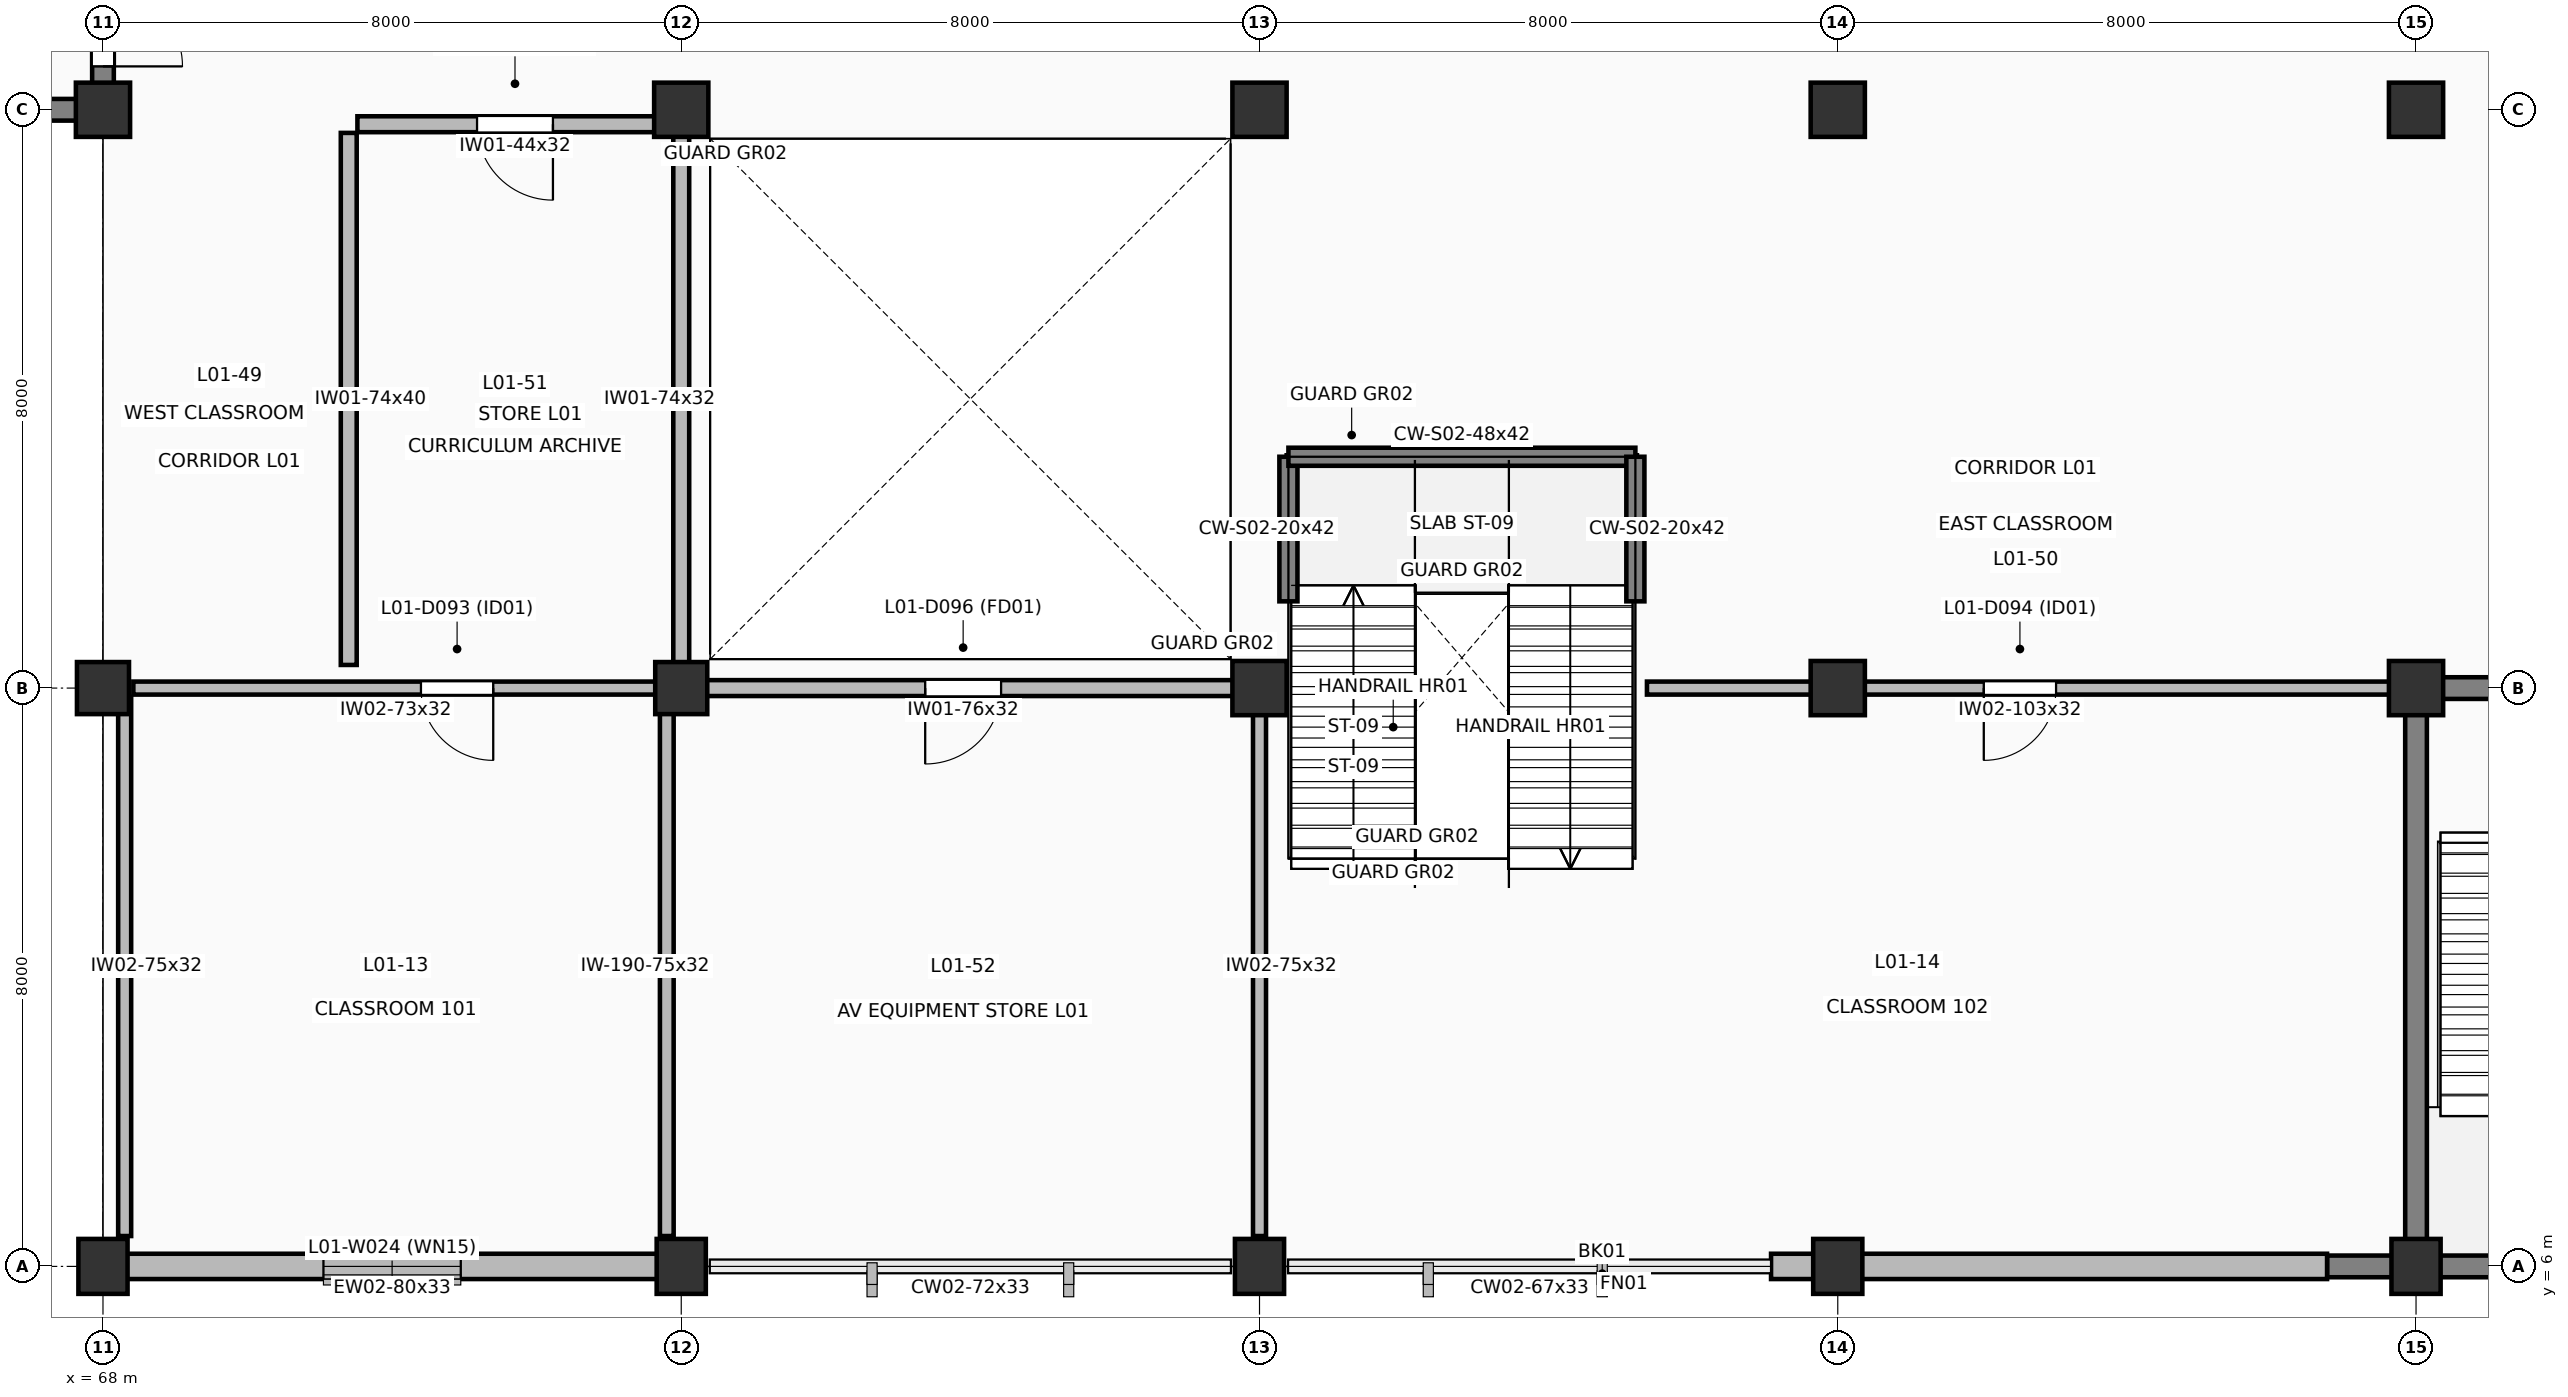
"""IFC4 building model, lengths in metres.
Left out: names, types, materials, properties, quantities, classifications, styles, units other than length and angle.
Written with IfcOpenShell. Run it as: python <this file> out.ifc"""

import sys

from ifc_helpers import new_model, si_unit, direction, frame, frame_2d, origin, origin_2d, place, context, subcontext, project, spatial, rectangle, extrude, element, fill, save


model = new_model("IFC4")
c1 = context("Model", 3, precision=1e-05, world=origin(), true_north=direction((0.0, 1.0)))
c2 = subcontext(c1, "Body", "Model", "MODEL_VIEW")
j1 = project(units=[si_unit("LENGTHUNIT", "METRE"), si_unit("PLANEANGLEUNIT", "RADIAN")], contexts=[c1])
p1 = place(None, origin())
s1 = spatial("IfcSite", under=j1, at=p1, CompositionType="ELEMENT")
p2 = place(p1, origin())
s2 = spatial("IfcBuilding", under=s1, at=p2, CompositionType="ELEMENT")
p3 = place(p2, frame((0.0, 0.0, 5.4)))
s3 = spatial("IfcBuildingStorey", under=s2, at=p3, CompositionType="ELEMENT", Elevation=5.4)
p4 = place(p3, frame((68.0, 6.0, 0.0), z_axis=(0.0, 0.0, 1.0), x_axis=(1.0, 0.0, 0.0)))
e1 = element("IfcColumn", 1, at=p4, inside=s3, PredefinedType="PILASTER", context=c2, shape_type="SweptSolid", body=[
    extrude(rectangle(XDim=0.68, YDim=0.76, at=origin_2d()), origin(), (0.0, 0.0, 1.0), 4.2),
])
p5 = place(p3, frame((68.0, 14.0, 0.0), z_axis=(0.0, 0.0, 1.0), x_axis=(1.0, 0.0, 0.0)))
e2 = element("IfcColumn", 2, at=p5, inside=s3, PredefinedType="COLUMN", context=c2, shape_type="SweptSolid", body=[
    extrude(rectangle(XDim=0.72, YDim=0.72, at=origin_2d()), origin(), (0.0, 0.0, 1.0), 4.2),
])
p6 = place(p3, frame((68.0, 22.0, 0.0), z_axis=(0.0, 0.0, 1.0), x_axis=(1.0, 0.0, 0.0)))
e3 = element("IfcColumn", 3, at=p6, inside=s3, PredefinedType="COLUMN", context=c2, shape_type="SweptSolid", body=[
    extrude(rectangle(XDim=0.75, YDim=0.75, at=origin_2d()), origin(), (0.0, 0.0, 1.0), 4.2),
])
p7 = place(p3, frame((76.0, 6.0, 0.0), z_axis=(0.0, 0.0, 1.0), x_axis=(1.0, 0.0, 0.0)))
e4 = element("IfcColumn", 4, at=p7, inside=s3, PredefinedType="PILASTER", context=c2, shape_type="SweptSolid", body=[
    extrude(rectangle(XDim=0.68, YDim=0.76, at=origin_2d()), origin(), (0.0, 0.0, 1.0), 4.2),
])
p8 = place(p3, frame((76.0, 14.0, 0.0), z_axis=(0.0, 0.0, 1.0), x_axis=(1.0, 0.0, 0.0)))
e5 = element("IfcColumn", 5, at=p8, inside=s3, PredefinedType="COLUMN", context=c2, shape_type="SweptSolid", body=[
    extrude(rectangle(XDim=0.72, YDim=0.72, at=origin_2d()), origin(), (0.0, 0.0, 1.0), 4.2),
])
p9 = place(p3, frame((76.0, 22.0, 0.0), z_axis=(0.0, 0.0, 1.0), x_axis=(1.0, 0.0, 0.0)))
e6 = element("IfcColumn", 6, at=p9, inside=s3, PredefinedType="COLUMN", context=c2, shape_type="SweptSolid", body=[
    extrude(rectangle(XDim=0.75, YDim=0.75, at=origin_2d()), origin(), (0.0, 0.0, 1.0), 4.2),
])
p10 = place(p3, frame((84.0, 6.0, 0.0), z_axis=(0.0, 0.0, 1.0), x_axis=(1.0, 0.0, 0.0)))
e7 = element("IfcColumn", 7, at=p10, inside=s3, PredefinedType="PILASTER", context=c2, shape_type="SweptSolid", body=[
    extrude(rectangle(XDim=0.68, YDim=0.76, at=origin_2d()), origin(), (0.0, 0.0, 1.0), 4.2),
])
for number, where, z_axis, x_axis in (
    (8, (84.0, 14.0, 0.0), (0.0, 0.0, 1.0), (1.0, 0.0, 0.0)),
    (9, (84.0, 22.0, 0.0), (0.0, 0.0, 1.0), (1.0, 0.0, 0.0)),
):
    element("IfcColumn", number, at=place(p3, frame(where, z_axis=z_axis, x_axis=x_axis)), inside=s3, PredefinedType="COLUMN", context=c2, shape_type="SweptSolid", body=[
        extrude(rectangle(XDim=0.75, YDim=0.75, at=origin_2d()), origin(), (0.0, 0.0, 1.0), 4.2),
    ])
p11 = place(p3, frame((92.0, 6.0, 0.0), z_axis=(0.0, 0.0, 1.0), x_axis=(1.0, 0.0, 0.0)))
e10 = element("IfcColumn", 10, at=p11, inside=s3, PredefinedType="PILASTER", context=c2, shape_type="SweptSolid", body=[
    extrude(rectangle(XDim=0.68, YDim=0.76, at=origin_2d()), origin(), (0.0, 0.0, 1.0), 4.2),
])
for number, where, z_axis, x_axis in (
    (11, (92.0, 14.0, 0.0), (0.0, 0.0, 1.0), (1.0, 0.0, 0.0)),
    (12, (92.0, 22.0, 0.0), (0.0, 0.0, 1.0), (1.0, 0.0, 0.0)),
):
    element("IfcColumn", number, at=place(p3, frame(where, z_axis=z_axis, x_axis=x_axis)), inside=s3, PredefinedType="COLUMN", context=c2, shape_type="SweptSolid", body=[
        extrude(rectangle(XDim=0.75, YDim=0.75, at=origin_2d()), origin(), (0.0, 0.0, 1.0), 4.2),
    ])
p12 = place(p3, frame((100.0, 6.0, 0.0), z_axis=(0.0, 0.0, 1.0), x_axis=(1.0, 0.0, 0.0)))
e13 = element("IfcColumn", 13, at=p12, inside=s3, PredefinedType="PILASTER", context=c2, shape_type="SweptSolid", body=[
    extrude(rectangle(XDim=0.68, YDim=0.76, at=origin_2d()), origin(), (0.0, 0.0, 1.0), 4.2),
])
for number, where, z_axis, x_axis in (
    (14, (100.0, 14.0, 0.0), (0.0, 0.0, 1.0), (1.0, 0.0, 0.0)),
    (15, (100.0, 22.0, 0.0), (0.0, 0.0, 1.0), (1.0, 0.0, 0.0)),
):
    element("IfcColumn", number, at=place(p3, frame(where, z_axis=z_axis, x_axis=x_axis)), inside=s3, PredefinedType="COLUMN", context=c2, shape_type="SweptSolid", body=[
        extrude(rectangle(XDim=0.75, YDim=0.75, at=origin_2d()), origin(), (0.0, 0.0, 1.0), 4.2),
    ])
p13 = place(p3, frame((106.461, 6.0, 0.0), z_axis=(0.0, 0.0, 1.0), x_axis=(-1.0, 0.0, 0.0)))
e16 = element("IfcWall", 16, at=p13, inside=s3, PredefinedType="SOLIDWALL", context=c2, shape_type="SweptSolid", body=[
    extrude(rectangle(XDim=7.692, YDim=0.3, at=frame_2d((3.846, 0.0))), origin(), (0.0, 0.0, 1.0), 4.2),
])
p14 = place(p3, frame((98.769, 6.0, 0.0), z_axis=(0.0, 0.0, 1.0), x_axis=(-1.0, 0.0, 0.0)))
e17 = element("IfcWall", 17, at=p14, inside=s3, PredefinedType="SOLIDWALL", context=c2, shape_type="SweptSolid", body=[
    extrude(rectangle(XDim=7.692, YDim=0.35, at=frame_2d((3.846, 0.0))), origin(), (0.0, 0.0, 1.0), 3.315),
])
p15 = place(p3, frame((76.0, 6.0, 0.0), z_axis=(0.0, 0.0, 1.0), x_axis=(-1.0, 0.0, 0.0)))
e18 = element("IfcWall", 18, at=p15, inside=s3, PredefinedType="SOLIDWALL", context=c2, shape_type="SweptSolid", body=[
    extrude(rectangle(XDim=8.0, YDim=0.35, at=frame_2d((4.0, 0.0))), origin(), (0.0, 0.0, 1.0), 3.315),
])
p16 = place(p15, frame((3.05, 0.0, 0.9)))
e19 = element("IfcOpeningElement", 19, at=p16, cuts=e18, PredefinedType="OPENING", context=c2, shape_type="SweptSolid", body=[
    extrude(rectangle(XDim=1.9, YDim=2.1, at=frame_2d((0.95, 1.05))), frame((0.0, 0.185, 0.0), z_axis=(0.0, -1.0, 0.0), x_axis=(1.0, 0.0, 0.0)), (0.0, 0.0, 1.0), 0.37),
])
p17 = place(p3, frame((68.0, 22.0, 0.0), z_axis=(0.0, 0.0, 1.0), x_axis=(-1.0, 0.0, 0.0)))
e20 = element("IfcWall", 20, at=p17, inside=s3, PredefinedType="SOLIDWALL", context=c2, shape_type="SweptSolid", body=[
    extrude(rectangle(XDim=8.0, YDim=0.3, at=frame_2d((4.0, 0.0))), origin(), (0.0, 0.0, 1.0), 4.2),
])
p18 = place(p3, frame((68.0, 30.0, 0.0), z_axis=(0.0, 0.0, 1.0), x_axis=(0.0, -1.0, 0.0)))
e21 = element("IfcWall", 21, at=p18, inside=s3, PredefinedType="SHEAR", context=c2, shape_type="SweptSolid", body=[
    extrude(rectangle(XDim=8.0, YDim=0.3, at=frame_2d((4.0, 0.0))), origin(), (0.0, 0.0, 1.0), 4.2),
])
p19 = place(p18, frame((6.3, 0.0, 0.0)))
e22 = element("IfcOpeningElement", 22, at=p19, cuts=e21, PredefinedType="OPENING", context=c2, shape_type="SweptSolid", body=[
    extrude(rectangle(XDim=1.1, YDim=2.2, at=frame_2d((0.55, 1.1))), frame((0.0, 0.16, 0.0), z_axis=(0.0, -1.0, 0.0), x_axis=(1.0, 0.0, 0.0)), (0.0, 0.0, 1.0), 0.32),
])
p20 = place(p18, frame((2.15, 0.0, 0.0)))
e23 = element("IfcOpeningElement", 23, at=p20, cuts=e21, PredefinedType="OPENING", context=c2, shape_type="SweptSolid", body=[
    extrude(rectangle(XDim=1.1, YDim=2.2, at=frame_2d((0.55, 1.1))), frame((0.0, 0.16, 0.0), z_axis=(0.0, -1.0, 0.0), x_axis=(1.0, 0.0, 0.0)), (0.0, 0.0, 1.0), 0.32),
])
p21 = place(p3, frame((100.0, 6.0, 0.0), z_axis=(0.0, 0.0, 1.0), x_axis=(0.0, 1.0, 0.0)))
e24 = element("IfcWall", 24, at=p21, inside=s3, PredefinedType="SHEAR", context=c2, shape_type="SweptSolid", body=[
    extrude(rectangle(XDim=8.0, YDim=0.3, at=frame_2d((4.0, 0.0))), origin(), (0.0, 0.0, 1.0), 4.2),
])
p22 = place(p3, frame((100.0, 14.0, 0.0), z_axis=(0.0, 0.0, 1.0), x_axis=(1.0, 0.0, 0.0)))
e25 = element("IfcWall", 25, at=p22, inside=s3, PredefinedType="SHEAR", context=c2, shape_type="SweptSolid", body=[
    extrude(rectangle(XDim=8.0, YDim=0.3, at=frame_2d((4.0, 0.0))), origin(), (0.0, 0.0, 1.0), 4.2),
])
p23 = place(p22, frame((1.65, 0.0, 0.0)))
e26 = element("IfcOpeningElement", 26, at=p23, cuts=e25, PredefinedType="OPENING", context=c2, shape_type="SweptSolid", body=[
    extrude(rectangle(XDim=1.1, YDim=2.2, at=frame_2d((0.55, 1.1))), frame((0.0, 0.16, 0.0), z_axis=(0.0, -1.0, 0.0), x_axis=(1.0, 0.0, 0.0)), (0.0, 0.0, 1.0), 0.32),
])
p24 = place(p22, frame((5.95, 0.0, 0.0)))
e27 = element("IfcOpeningElement", 27, at=p24, cuts=e25, PredefinedType="OPENING", context=c2, shape_type="SweptSolid", body=[
    extrude(rectangle(XDim=1.1, YDim=2.2, at=frame_2d((0.55, 1.1))), frame((0.0, 0.16, 0.0), z_axis=(0.0, -1.0, 0.0), x_axis=(1.0, 0.0, 0.0)), (0.0, 0.0, 1.0), 0.32),
])
p25 = place(p3, frame((84.4, 15.2, 0.0), z_axis=(0.0, 0.0, 1.0), x_axis=(0.0, 1.0, 0.0)))
e28 = element("IfcWall", 28, at=p25, inside=s3, PredefinedType="SHEAR", context=c2, shape_type="SweptSolid", body=[
    extrude(rectangle(XDim=2.0, YDim=0.25, at=frame_2d((1.0, 0.0))), origin(), (0.0, 0.0, 1.0), 4.2),
])
p26 = place(p3, frame((84.4, 17.2, 0.0), z_axis=(0.0, 0.0, 1.0), x_axis=(1.0, 0.0, 0.0)))
e29 = element("IfcWall", 29, at=p26, inside=s3, PredefinedType="SHEAR", context=c2, shape_type="SweptSolid", body=[
    extrude(rectangle(XDim=4.8, YDim=0.25, at=frame_2d((2.4, 0.0))), origin(), (0.0, 0.0, 1.0), 4.2),
])
p27 = place(p3, frame((89.2, 17.2, 0.0), z_axis=(0.0, 0.0, 1.0), x_axis=(0.0, -1.0, 0.0)))
e30 = element("IfcWall", 30, at=p27, inside=s3, PredefinedType="SHEAR", context=c2, shape_type="SweptSolid", body=[
    extrude(rectangle(XDim=2.0, YDim=0.25, at=frame_2d((1.0, 0.0))), origin(), (0.0, 0.0, 1.0), 4.2),
])
p28 = place(p3, frame((75.68, 14.0, 0.0), z_axis=(0.0, 0.0, 1.0), x_axis=(-1.0, 0.0, 0.0)))
e31 = element("IfcWall", 31, at=p28, inside=s3, PredefinedType="PARTITIONING", context=c2, shape_type="SweptSolid", body=[
    extrude(rectangle(XDim=7.26, YDim=0.18, at=frame_2d((3.63, 0.0))), origin(), (0.0, 0.0, 1.0), 3.165),
])
p29 = place(p28, frame((2.281, 0.0, 0.0)))
e32 = element("IfcOpeningElement", 32, at=p29, cuts=e31, PredefinedType="OPENING", context=c2, shape_type="SweptSolid", body=[
    extrude(rectangle(XDim=1.0, YDim=2.15, at=frame_2d((0.5, 1.075))), frame((0.0, 0.1, 0.0), z_axis=(0.0, -1.0, 0.0), x_axis=(1.0, 0.0, 0.0)), (0.0, 0.0, 1.0), 0.2),
])
p30 = place(p3, frame((68.3, 13.88, 0.0), z_axis=(0.0, 0.0, 1.0), x_axis=(0.0, -1.0, 0.0)))
e33 = element("IfcWall", 33, at=p30, inside=s3, PredefinedType="PARTITIONING", context=c2, shape_type="SweptSolid", body=[
    extrude(rectangle(XDim=7.46, YDim=0.18, at=frame_2d((3.73, 0.0))), origin(), (0.0, 0.0, 1.0), 3.225),
])
p31 = place(p3, frame((75.8, 6.42, 0.0), z_axis=(0.0, 0.0, 1.0), x_axis=(0.0, 1.0, 0.0)))
e34 = element("IfcWall", 34, at=p31, inside=s3, PredefinedType="PARTITIONING", context=c2, shape_type="SweptSolid", body=[
    extrude(rectangle(XDim=7.46, YDim=0.19, at=frame_2d((3.73, 0.0))), origin(), (0.0, 0.0, 1.0), 3.225),
])
p32 = place(p3, frame((99.68, 14.0, 0.0), z_axis=(0.0, 0.0, 1.0), x_axis=(-1.0, 0.0, 0.0)))
e35 = element("IfcWall", 35, at=p32, inside=s3, PredefinedType="PARTITIONING", context=c2, shape_type="SweptSolid", body=[
    extrude(rectangle(XDim=10.32, YDim=0.18, at=frame_2d((5.16, 0.0))), origin(), (0.0, 0.0, 1.0), 3.165),
])
p33 = place(p32, frame((4.66, 0.0, 0.0)))
e36 = element("IfcOpeningElement", 36, at=p33, cuts=e35, PredefinedType="OPENING", context=c2, shape_type="SweptSolid", body=[
    extrude(rectangle(XDim=1.0, YDim=2.15, at=frame_2d((0.5, 1.075))), frame((0.0, 0.1, 0.0), z_axis=(0.0, -1.0, 0.0), x_axis=(1.0, 0.0, 0.0)), (0.0, 0.0, 1.0), 0.2),
])
p34 = place(p3, frame((84.0, 13.88, 0.0), z_axis=(0.0, 0.0, 1.0), x_axis=(0.0, -1.0, 0.0)))
e37 = element("IfcWall", 37, at=p34, inside=s3, PredefinedType="PARTITIONING", context=c2, shape_type="SweptSolid", body=[
    extrude(rectangle(XDim=7.46, YDim=0.18, at=frame_2d((3.73, 0.0))), origin(), (0.0, 0.0, 1.0), 3.225),
])
p35 = place(p3, frame((75.88, 21.8, 0.0), z_axis=(0.0, 0.0, 1.0), x_axis=(-1.0, 0.0, 0.0)))
e38 = element("IfcWall", 38, at=p35, inside=s3, PredefinedType="SOLIDWALL", context=c2, shape_type="SweptSolid", body=[
    extrude(rectangle(XDim=4.36, YDim=0.22, at=frame_2d((2.18, 0.0))), origin(), (0.0, 0.0, 1.0), 3.165),
])
p36 = place(p35, frame((1.655, 0.0, 0.0)))
e39 = element("IfcOpeningElement", 39, at=p36, cuts=e38, PredefinedType="OPENING", context=c2, shape_type="SweptSolid", body=[
    extrude(rectangle(XDim=1.05, YDim=2.2, at=frame_2d((0.525, 1.1))), frame((0.0, 0.12, 0.0), z_axis=(0.0, -1.0, 0.0), x_axis=(1.0, 0.0, 0.0)), (0.0, 0.0, 1.0), 0.24),
])
p37 = place(p3, frame((71.4, 21.68, 0.0), z_axis=(0.0, 0.0, 1.0), x_axis=(0.0, -1.0, 0.0)))
e40 = element("IfcWall", 40, at=p37, inside=s3, PredefinedType="SOLIDWALL", context=c2, shape_type="SweptSolid", body=[
    extrude(rectangle(XDim=7.36, YDim=0.22, at=frame_2d((3.68, 0.0))), origin(), (0.0, 0.0, 1.0), 3.98),
])
p38 = place(p3, frame((76.0, 14.32, 0.0), z_axis=(0.0, 0.0, 1.0), x_axis=(0.0, 1.0, 0.0)))
e41 = element("IfcWall", 41, at=p38, inside=s3, PredefinedType="SOLIDWALL", context=c2, shape_type="SweptSolid", body=[
    extrude(rectangle(XDim=7.36, YDim=0.22, at=frame_2d((3.68, 0.0))), origin(), (0.0, 0.0, 1.0), 3.225),
])
p39 = place(p3, frame((83.68, 14.0, 0.0), z_axis=(0.0, 0.0, 1.0), x_axis=(-1.0, 0.0, 0.0)))
e42 = element("IfcWall", 42, at=p39, inside=s3, PredefinedType="SOLIDWALL", context=c2, shape_type="SweptSolid", body=[
    extrude(rectangle(XDim=7.56, YDim=0.22, at=frame_2d((3.78, 0.0))), origin(), (0.0, 0.0, 1.0), 3.165),
])
p40 = place(p39, frame((3.255, 0.0, 0.0)))
e43 = element("IfcOpeningElement", 43, at=p40, cuts=e42, PredefinedType="OPENING", context=c2, shape_type="SweptSolid", body=[
    extrude(rectangle(XDim=1.05, YDim=2.2, at=frame_2d((0.525, 1.1))), frame((0.0, 0.12, 0.0), z_axis=(0.0, -1.0, 0.0), x_axis=(1.0, 0.0, 0.0)), (0.0, 0.0, 1.0), 0.24),
])
p41 = place(p16, origin())
e44 = element("IfcWindow", 44, at=p41, inside=s3, PartitioningType="DOUBLE_PANEL_VERTICAL", PredefinedType="WINDOW", context=c2, shape_type="SweptSolid", body=[
    extrude(rectangle(XDim=1.9, YDim=2.1, at=frame_2d((0.95, 1.05))), frame((0.0, 0.03, 0.0), z_axis=(0.0, -1.0, 0.0), x_axis=(1.0, 0.0, 0.0)), (0.0, 0.0, 1.0), 0.06),
])
fill(e19, e44)
p42 = place(p19, origin())
e45 = element("IfcDoor", 45, at=p42, inside=s3, OperationType="SINGLE_SWING_RIGHT", PredefinedType="DOOR", context=c2, shape_type="SweptSolid", body=[
    extrude(rectangle(XDim=1.1, YDim=2.2, at=frame_2d((0.55, 1.1))), frame((0.0, 0.025, 0.0), z_axis=(0.0, -1.0, 0.0), x_axis=(1.0, 0.0, 0.0)), (0.0, 0.0, 1.0), 0.05),
])
fill(e22, e45)
p43 = place(p29, origin())
e46 = element("IfcDoor", 46, at=p43, inside=s3, OperationType="SINGLE_SWING_LEFT", PredefinedType="DOOR", context=c2, shape_type="SweptSolid", body=[
    extrude(rectangle(XDim=1.0, YDim=2.15, at=frame_2d((0.5, 1.075))), frame((0.0, 0.025, 0.0), z_axis=(0.0, -1.0, 0.0), x_axis=(1.0, 0.0, 0.0)), (0.0, 0.0, 1.0), 0.05),
])
fill(e32, e46)
p44 = place(p33, origin())
e47 = element("IfcDoor", 47, at=p44, inside=s3, OperationType="SINGLE_SWING_RIGHT", PredefinedType="DOOR", context=c2, shape_type="SweptSolid", body=[
    extrude(rectangle(XDim=1.0, YDim=2.15, at=frame_2d((0.5, 1.075))), frame((0.0, 0.025, 0.0), z_axis=(0.0, -1.0, 0.0), x_axis=(1.0, 0.0, 0.0)), (0.0, 0.0, 1.0), 0.05),
])
fill(e36, e47)
p45 = place(p36, origin())
e48 = element("IfcDoor", 48, at=p45, inside=s3, OperationType="SINGLE_SWING_LEFT", PredefinedType="DOOR", context=c2, shape_type="SweptSolid", body=[
    extrude(rectangle(XDim=1.05, YDim=2.2, at=frame_2d((0.525, 1.1))), frame((0.0, 0.025, 0.0), z_axis=(0.0, -1.0, 0.0), x_axis=(1.0, 0.0, 0.0)), (0.0, 0.0, 1.0), 0.05),
])
fill(e39, e48)
p46 = place(p40, origin())
e49 = element("IfcDoor", 49, at=p46, inside=s3, OperationType="SINGLE_SWING_RIGHT", PredefinedType="DOOR", context=c2, shape_type="SweptSolid", body=[
    extrude(rectangle(XDim=1.05, YDim=2.2, at=frame_2d((0.525, 1.1))), frame((0.0, 0.025, 0.0), z_axis=(0.0, -1.0, 0.0), x_axis=(1.0, 0.0, 0.0)), (0.0, 0.0, 1.0), 0.05),
])
fill(e43, e49)
save(model, sys.argv[1])
